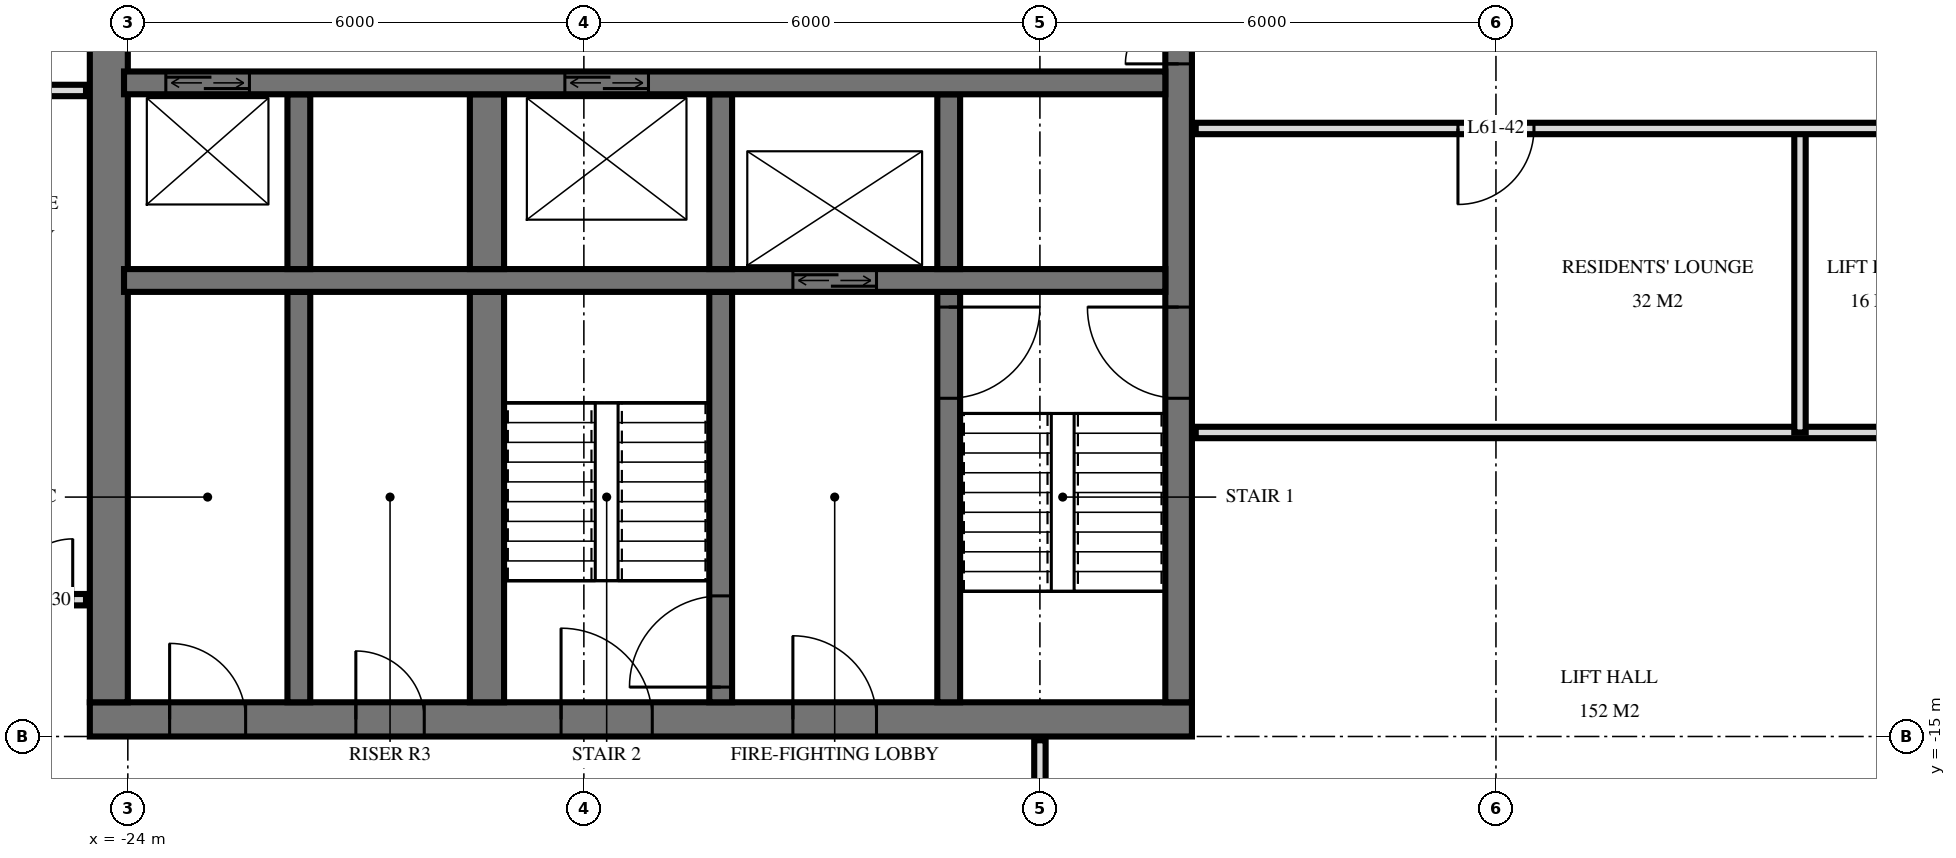
"""IFC4 building model, lengths in metres.
Left out: names, types, materials, properties, quantities, classifications, styles, units other than length and angle.
Written with IfcOpenShell. Run it as: python <this file> out.ifc"""

import sys

from ifc_helpers import new_model, si_unit, direction, frame, frame_2d, origin, place, context, subcontext, project, spatial, rectangle, extrude, element, fill, save


model = new_model("IFC4")
c1 = context("Model", 3, precision=1e-05, world=origin(), true_north=direction((0.0, 1.0)))
c2 = subcontext(c1, "Body", "Model", "MODEL_VIEW")
j1 = project(units=[si_unit("LENGTHUNIT", "METRE"), si_unit("PLANEANGLEUNIT", "RADIAN")], contexts=[c1])
p1 = place(None, origin())
s1 = spatial("IfcSite", under=j1, at=p1, CompositionType="ELEMENT")
p2 = place(p1, origin())
s2 = spatial("IfcBuilding", under=s1, at=p2, CompositionType="ELEMENT")
p3 = place(p2, frame((0.0, 0.0, 232.6)))
s3 = spatial("IfcBuildingStorey", under=s2, at=p3, CompositionType="ELEMENT", Elevation=232.6)
p4 = place(p3, frame((-24.5, -14.775, 0.0), z_axis=(0.0, 0.0, 1.0), x_axis=(1.0, 0.0, 0.0)))
e1 = element("IfcWall", 1, at=p4, inside=s3, PredefinedType="SHEAR", context=c2, shape_type="SweptSolid", body=[
    extrude(rectangle(XDim=14.5, YDim=0.45, at=frame_2d((7.25, 0.0))), origin(), (0.0, 0.0, 1.0), 3.5),
])
p5 = place(p4, frame((6.2, 0.0, 0.0)))
e2 = element("IfcOpeningElement", 2, at=p5, cuts=e1, PredefinedType="OPENING", context=c2, shape_type="SweptSolid", body=[
    extrude(rectangle(XDim=1.2, YDim=2.1, at=frame_2d((0.6, 1.05))), frame((0.0, 0.235, 0.0), z_axis=(0.0, -1.0, 0.0), x_axis=(1.0, 0.0, 0.0)), (0.0, 0.0, 1.0), 0.47),
])
p6 = place(p4, frame((9.25, 0.0, 0.0)))
e3 = element("IfcOpeningElement", 3, at=p6, cuts=e1, PredefinedType="OPENING", context=c2, shape_type="SweptSolid", body=[
    extrude(rectangle(XDim=1.1, YDim=2.1, at=frame_2d((0.55, 1.05))), frame((0.0, 0.235, 0.0), z_axis=(0.0, -1.0, 0.0), x_axis=(1.0, 0.0, 0.0)), (0.0, 0.0, 1.0), 0.47),
])
p7 = place(p4, frame((3.5, 0.0, 0.0)))
e4 = element("IfcOpeningElement", 4, at=p7, cuts=e1, PredefinedType="OPENING", context=c2, shape_type="SweptSolid", body=[
    extrude(rectangle(XDim=0.9, YDim=2.1, at=frame_2d((0.45, 1.05))), frame((0.0, 0.235, 0.0), z_axis=(0.0, -1.0, 0.0), x_axis=(1.0, 0.0, 0.0)), (0.0, 0.0, 1.0), 0.47),
])
p8 = place(p4, frame((1.05, 0.0, 0.0)))
e5 = element("IfcOpeningElement", 5, at=p8, cuts=e1, PredefinedType="OPENING", context=c2, shape_type="SweptSolid", body=[
    extrude(rectangle(XDim=1.0, YDim=2.1, at=frame_2d((0.5, 1.05))), frame((0.0, 0.235, 0.0), z_axis=(0.0, -1.0, 0.0), x_axis=(1.0, 0.0, 0.0)), (0.0, 0.0, 1.0), 0.47),
])
p9 = place(p3, frame((-10.175, -14.55, 0.0), z_axis=(0.0, 0.0, 1.0), x_axis=(0.0, 1.0, 0.0)))
e6 = element("IfcWall", 6, at=p9, inside=s3, PredefinedType="SHEAR", context=c2, shape_type="SweptSolid", body=[
    extrude(rectangle(XDim=14.1, YDim=0.35, at=frame_2d((7.05, 0.0))), origin(), (0.0, 0.0, 1.0), 3.5),
])
p10 = place(p9, frame((8.4, 0.0, 0.0)))
e7 = element("IfcOpeningElement", 7, at=p10, cuts=e6, PredefinedType="OPENING", context=c2, shape_type="SweptSolid", body=[
    extrude(rectangle(XDim=1.4, YDim=2.4, at=frame_2d((0.7, 1.2))), frame((0.0, 0.185, 0.0), z_axis=(0.0, -1.0, 0.0), x_axis=(1.0, 0.0, 0.0)), (0.0, 0.0, 1.0), 0.37),
])
p11 = place(p9, frame((10.0, 0.0, 0.0)))
e8 = element("IfcOpeningElement", 8, at=p11, cuts=e6, PredefinedType="OPENING", context=c2, shape_type="SweptSolid", body=[
    extrude(rectangle(XDim=1.4, YDim=2.4, at=frame_2d((0.7, 1.2))), frame((0.0, 0.185, 0.0), z_axis=(0.0, -1.0, 0.0), x_axis=(1.0, 0.0, 0.0)), (0.0, 0.0, 1.0), 0.37),
])
p12 = place(p9, frame((4.0, 0.0, 0.0)))
e9 = element("IfcOpeningElement", 9, at=p12, cuts=e6, PredefinedType="OPENING", context=c2, shape_type="SweptSolid", body=[
    extrude(rectangle(XDim=1.2, YDim=2.1, at=frame_2d((0.6, 1.05))), frame((0.0, 0.185, 0.0), z_axis=(0.0, -1.0, 0.0), x_axis=(1.0, 0.0, 0.0)), (0.0, 0.0, 1.0), 0.37),
])
p13 = place(p3, frame((-24.25, -14.55, 0.0), z_axis=(0.0, 0.0, 1.0), x_axis=(0.0, 1.0, 0.0)))
e10 = element("IfcWall", 10, at=p13, inside=s3, PredefinedType="SHEAR", context=c2, shape_type="SweptSolid", body=[
    extrude(rectangle(XDim=14.1, YDim=0.5, at=frame_2d((7.05, 0.0))), origin(), (0.0, 0.0, 1.0), 3.5),
])
p14 = place(p3, frame((-24.05, -6.4, 0.0), z_axis=(0.0, 0.0, 1.0), x_axis=(1.0, 0.0, 0.0)))
e11 = element("IfcWall", 11, at=p14, inside=s3, PredefinedType="SHEAR", context=c2, shape_type="SweptSolid", body=[
    extrude(rectangle(XDim=13.7, YDim=0.3, at=frame_2d((6.85, 0.0))), origin(), (0.0, 0.0, 1.0), 3.5),
])
p15 = place(p14, frame((0.55, 0.0, 0.0)))
e12 = element("IfcOpeningElement", 12, at=p15, cuts=e11, PredefinedType="OPENING", context=c2, shape_type="SweptSolid", body=[
    extrude(rectangle(XDim=1.1, YDim=2.1, at=frame_2d((0.55, 1.05))), frame((0.0, 0.16, 0.0), z_axis=(0.0, -1.0, 0.0), x_axis=(1.0, 0.0, 0.0)), (0.0, 0.0, 1.0), 0.32),
])
p16 = place(p14, frame((5.8, 0.0, 0.0)))
e13 = element("IfcOpeningElement", 13, at=p16, cuts=e11, PredefinedType="OPENING", context=c2, shape_type="SweptSolid", body=[
    extrude(rectangle(XDim=1.1, YDim=2.1, at=frame_2d((0.55, 1.05))), frame((0.0, 0.16, 0.0), z_axis=(0.0, -1.0, 0.0), x_axis=(1.0, 0.0, 0.0)), (0.0, 0.0, 1.0), 0.32),
])
p17 = place(p3, frame((-24.05, -9.0, 0.0), z_axis=(0.0, 0.0, 1.0), x_axis=(1.0, 0.0, 0.0)))
e14 = element("IfcWall", 14, at=p17, inside=s3, PredefinedType="SHEAR", context=c2, shape_type="SweptSolid", body=[
    extrude(rectangle(XDim=13.7, YDim=0.3, at=frame_2d((6.85, 0.0))), origin(), (0.0, 0.0, 1.0), 3.5),
])
p18 = place(p17, frame((8.8, 0.0, 0.0)))
e15 = element("IfcOpeningElement", 15, at=p18, cuts=e14, PredefinedType="OPENING", context=c2, shape_type="SweptSolid", body=[
    extrude(rectangle(XDim=1.1, YDim=2.1, at=frame_2d((0.55, 1.05))), frame((0.0, 0.16, 0.0), z_axis=(0.0, -1.0, 0.0), x_axis=(1.0, 0.0, 0.0)), (0.0, 0.0, 1.0), 0.32),
])
p19 = place(p3, frame((-13.2, -8.85, 0.0), z_axis=(0.0, 0.0, 1.0), x_axis=(0.0, 1.0, 0.0)))
e16 = element("IfcWall", 16, at=p19, inside=s3, PredefinedType="SHEAR", context=c2, shape_type="SweptSolid", body=[
    extrude(rectangle(XDim=2.3, YDim=0.3, at=frame_2d((1.15, 0.0))), origin(), (0.0, 0.0, 1.0), 3.5),
])
p20 = place(p3, frame((-13.2, -14.55, 0.0), z_axis=(0.0, 0.0, 1.0), x_axis=(0.0, 1.0, 0.0)))
e17 = element("IfcWall", 17, at=p20, inside=s3, PredefinedType="SHEAR", context=c2, shape_type="SweptSolid", body=[
    extrude(rectangle(XDim=5.4, YDim=0.3, at=frame_2d((2.7, 0.0))), origin(), (0.0, 0.0, 1.0), 3.5),
])
p21 = place(p20, frame((4.0, 0.0, 0.0)))
e18 = element("IfcOpeningElement", 18, at=p21, cuts=e17, PredefinedType="OPENING", context=c2, shape_type="SweptSolid", body=[
    extrude(rectangle(XDim=1.2, YDim=2.1, at=frame_2d((0.6, 1.05))), frame((0.0, 0.16, 0.0), z_axis=(0.0, -1.0, 0.0), x_axis=(1.0, 0.0, 0.0)), (0.0, 0.0, 1.0), 0.32),
])
p22 = place(p3, frame((-16.2, -8.85, 0.0), z_axis=(0.0, 0.0, 1.0), x_axis=(0.0, 1.0, 0.0)))
e19 = element("IfcWall", 19, at=p22, inside=s3, PredefinedType="SHEAR", context=c2, shape_type="SweptSolid", body=[
    extrude(rectangle(XDim=2.3, YDim=0.3, at=frame_2d((1.15, 0.0))), origin(), (0.0, 0.0, 1.0), 3.5),
])
p23 = place(p3, frame((-16.2, -14.55, 0.0), z_axis=(0.0, 0.0, 1.0), x_axis=(0.0, 1.0, 0.0)))
e20 = element("IfcWall", 20, at=p23, inside=s3, PredefinedType="SHEAR", context=c2, shape_type="SweptSolid", body=[
    extrude(rectangle(XDim=5.4, YDim=0.3, at=frame_2d((2.7, 0.0))), origin(), (0.0, 0.0, 1.0), 3.5),
])
p24 = place(p23, frame((0.2, 0.0, 0.0)))
e21 = element("IfcOpeningElement", 21, at=p24, cuts=e20, PredefinedType="OPENING", context=c2, shape_type="SweptSolid", body=[
    extrude(rectangle(XDim=1.2, YDim=2.1, at=frame_2d((0.6, 1.05))), frame((0.0, 0.16, 0.0), z_axis=(0.0, -1.0, 0.0), x_axis=(1.0, 0.0, 0.0)), (0.0, 0.0, 1.0), 0.32),
])
p25 = place(p3, frame((-19.275, -8.85, 0.0), z_axis=(0.0, 0.0, 1.0), x_axis=(0.0, 1.0, 0.0)))
e22 = element("IfcWall", 22, at=p25, inside=s3, PredefinedType="SHEAR", context=c2, shape_type="SweptSolid", body=[
    extrude(rectangle(XDim=2.3, YDim=0.45, at=frame_2d((1.15, 0.0))), origin(), (0.0, 0.0, 1.0), 3.5),
])
p26 = place(p3, frame((-19.275, -14.55, 0.0), z_axis=(0.0, 0.0, 1.0), x_axis=(0.0, 1.0, 0.0)))
e23 = element("IfcWall", 23, at=p26, inside=s3, PredefinedType="SHEAR", context=c2, shape_type="SweptSolid", body=[
    extrude(rectangle(XDim=5.4, YDim=0.45, at=frame_2d((2.7, 0.0))), origin(), (0.0, 0.0, 1.0), 3.5),
])
p27 = place(p3, frame((-21.75, -8.85, 0.0), z_axis=(0.0, 0.0, 1.0), x_axis=(0.0, 1.0, 0.0)))
e24 = element("IfcWall", 24, at=p27, inside=s3, PredefinedType="SHEAR", context=c2, shape_type="SweptSolid", body=[
    extrude(rectangle(XDim=2.3, YDim=0.3, at=frame_2d((1.15, 0.0))), origin(), (0.0, 0.0, 1.0), 3.5),
])
p28 = place(p3, frame((-21.75, -14.55, 0.0), z_axis=(0.0, 0.0, 1.0), x_axis=(0.0, 1.0, 0.0)))
e25 = element("IfcWall", 25, at=p28, inside=s3, PredefinedType="SHEAR", context=c2, shape_type="SweptSolid", body=[
    extrude(rectangle(XDim=5.4, YDim=0.3, at=frame_2d((2.7, 0.0))), origin(), (0.0, 0.0, 1.0), 3.5),
])
p29 = place(p3, frame((-2.0, -11.0, 0.0), z_axis=(0.0, 0.0, 1.0), x_axis=(0.0, 1.0, 0.0)))
e26 = element("IfcWall", 26, at=p29, inside=s3, PredefinedType="PARTITIONING", context=c2, shape_type="SweptSolid", body=[
    extrude(rectangle(XDim=4.0, YDim=0.15, at=frame_2d((2.0, 0.0))), origin(), (0.0, 0.0, 1.0), 3.22),
])
p30 = place(p3, frame((-12.0, -18.0, 0.0), z_axis=(0.0, 0.0, 1.0), x_axis=(0.0, 1.0, 0.0)))
e27 = element("IfcWall", 27, at=p30, inside=s3, PredefinedType="PARTITIONING", context=c2, shape_type="SweptSolid", body=[
    extrude(rectangle(XDim=2.95, YDim=0.15, at=frame_2d((1.475, 0.0))), origin(), (0.0, 0.0, 1.0), 3.22),
])
p31 = place(p30, frame((1.0, 0.0, 0.0)))
e28 = element("IfcOpeningElement", 28, at=p31, cuts=e27, PredefinedType="OPENING", context=c2, shape_type="SweptSolid", body=[
    extrude(rectangle(XDim=1.0, YDim=2.1, at=frame_2d((0.5, 1.05))), frame((0.0, 0.085, 0.0), z_axis=(0.0, -1.0, 0.0), x_axis=(1.0, 0.0, 0.0)), (0.0, 0.0, 1.0), 0.17),
])
p32 = place(p3, frame((-25.7, -13.2, 0.0), z_axis=(0.0, 0.0, 1.0), x_axis=(1.0, 0.0, 0.0)))
e29 = element("IfcWall", 29, at=p32, inside=s3, PredefinedType="PARTITIONING", context=c2, shape_type="SweptSolid", body=[
    extrude(rectangle(XDim=1.15, YDim=0.15, at=frame_2d((0.575, 0.0))), origin(), (0.0, 0.0, 1.0), 3.22),
])
p33 = place(p32, frame((0.175, 0.0, 0.0)))
e30 = element("IfcOpeningElement", 30, at=p33, cuts=e29, PredefinedType="OPENING", context=c2, shape_type="SweptSolid", body=[
    extrude(rectangle(XDim=0.8, YDim=2.1, at=frame_2d((0.4, 1.05))), frame((0.0, 0.085, 0.0), z_axis=(0.0, -1.0, 0.0), x_axis=(1.0, 0.0, 0.0)), (0.0, 0.0, 1.0), 0.17),
])
p34 = place(p3, frame((-9.95, -11.0, 0.0), z_axis=(0.0, 0.0, 1.0), x_axis=(1.0, 0.0, 0.0)))
e31 = element("IfcWall", 31, at=p34, inside=s3, PredefinedType="PARTITIONING", context=c2, shape_type="SweptSolid", body=[
    extrude(rectangle(XDim=19.9, YDim=0.15, at=frame_2d((9.95, 0.0))), origin(), (0.0, 0.0, 1.0), 3.22),
])
p35 = place(p34, frame((9.45, 0.0, 0.0)))
e32 = element("IfcOpeningElement", 32, at=p35, cuts=e31, PredefinedType="OPENING", context=c2, shape_type="SweptSolid", body=[
    extrude(rectangle(XDim=1.0, YDim=2.1, at=frame_2d((0.5, 1.05))), frame((0.0, 0.085, 0.0), z_axis=(0.0, -1.0, 0.0), x_axis=(1.0, 0.0, 0.0)), (0.0, 0.0, 1.0), 0.17),
])
p36 = place(p34, frame((15.45, 0.0, 0.0)))
e33 = element("IfcOpeningElement", 33, at=p36, cuts=e31, PredefinedType="OPENING", context=c2, shape_type="SweptSolid", body=[
    extrude(rectangle(XDim=1.0, YDim=2.1, at=frame_2d((0.5, 1.05))), frame((0.0, 0.085, 0.0), z_axis=(0.0, -1.0, 0.0), x_axis=(1.0, 0.0, 0.0)), (0.0, 0.0, 1.0), 0.17),
])
p37 = place(p3, frame((-9.95, -7.0, 0.0), z_axis=(0.0, 0.0, 1.0), x_axis=(1.0, 0.0, 0.0)))
e34 = element("IfcWall", 34, at=p37, inside=s3, PredefinedType="PARTITIONING", context=c2, shape_type="SweptSolid", body=[
    extrude(rectangle(XDim=19.9, YDim=0.15, at=frame_2d((9.95, 0.0))), origin(), (0.0, 0.0, 1.0), 3.22),
])
p38 = place(p37, frame((9.45, 0.0, 0.0)))
e35 = element("IfcOpeningElement", 35, at=p38, cuts=e34, PredefinedType="OPENING", context=c2, shape_type="SweptSolid", body=[
    extrude(rectangle(XDim=1.0, YDim=2.1, at=frame_2d((0.5, 1.05))), frame((0.0, 0.085, 0.0), z_axis=(0.0, -1.0, 0.0), x_axis=(1.0, 0.0, 0.0)), (0.0, 0.0, 1.0), 0.17),
])
p39 = place(p37, frame((3.45, 0.0, 0.0)))
e36 = element("IfcOpeningElement", 36, at=p39, cuts=e34, PredefinedType="OPENING", context=c2, shape_type="SweptSolid", body=[
    extrude(rectangle(XDim=1.0, YDim=2.1, at=frame_2d((0.5, 1.05))), frame((0.0, 0.085, 0.0), z_axis=(0.0, -1.0, 0.0), x_axis=(1.0, 0.0, 0.0)), (0.0, 0.0, 1.0), 0.17),
])
p40 = place(p3, frame((-26.82, -6.5, 0.0), z_axis=(0.0, 0.0, 1.0), x_axis=(1.0, 0.0, 0.0)))
e37 = element("IfcWall", 37, at=p40, inside=s3, PredefinedType="PARTITIONING", context=c2, shape_type="SweptSolid", body=[
    extrude(rectangle(XDim=2.27, YDim=0.15, at=frame_2d((1.135, 0.0))), origin(), (0.0, 0.0, 1.0), 3.22),
])
p41 = place(p40, frame((0.62, 0.0, 0.0)))
e38 = element("IfcOpeningElement", 38, at=p41, cuts=e37, PredefinedType="OPENING", context=c2, shape_type="SweptSolid", body=[
    extrude(rectangle(XDim=0.9, YDim=2.1, at=frame_2d((0.45, 1.05))), frame((0.0, 0.085, 0.0), z_axis=(0.0, -1.0, 0.0), x_axis=(1.0, 0.0, 0.0)), (0.0, 0.0, 1.0), 0.17),
])
p42 = place(p15, origin())
e39 = element("IfcDoor", 39, at=p42, inside=s3, OperationType="DOUBLE_DOOR_SLIDING", PredefinedType="USERDEFINED", context=c2, shape_type="SweptSolid", body=[
    extrude(rectangle(XDim=1.1, YDim=2.1, at=frame_2d((0.55, 1.05))), frame((0.0, 0.025, 0.0), z_axis=(0.0, -1.0, 0.0), x_axis=(1.0, 0.0, 0.0)), (0.0, 0.0, 1.0), 0.05),
])
fill(e12, e39)
p43 = place(p18, origin())
e40 = element("IfcDoor", 40, at=p43, inside=s3, OperationType="DOUBLE_DOOR_SLIDING", PredefinedType="USERDEFINED", context=c2, shape_type="SweptSolid", body=[
    extrude(rectangle(XDim=1.1, YDim=2.1, at=frame_2d((0.55, 1.05))), frame((0.0, 0.025, 0.0), z_axis=(0.0, -1.0, 0.0), x_axis=(1.0, 0.0, 0.0)), (0.0, 0.0, 1.0), 0.05),
])
fill(e15, e40)
p44 = place(p16, origin())
e41 = element("IfcDoor", 41, at=p44, inside=s3, OperationType="DOUBLE_DOOR_SLIDING", PredefinedType="USERDEFINED", context=c2, shape_type="SweptSolid", body=[
    extrude(rectangle(XDim=1.1, YDim=2.1, at=frame_2d((0.55, 1.05))), frame((0.0, 0.025, 0.0), z_axis=(0.0, -1.0, 0.0), x_axis=(1.0, 0.0, 0.0)), (0.0, 0.0, 1.0), 0.05),
])
fill(e13, e41)
p45 = place(p10, origin())
e42 = element("IfcDoor", 42, at=p45, inside=s3, OperationType="DOUBLE_DOOR_SINGLE_SWING", PredefinedType="DOOR", context=c2, shape_type="SweptSolid", body=[
    extrude(rectangle(XDim=1.4, YDim=2.4, at=frame_2d((0.7, 1.2))), frame((0.0, 0.025, 0.0), z_axis=(0.0, -1.0, 0.0), x_axis=(1.0, 0.0, 0.0)), (0.0, 0.0, 1.0), 0.05),
])
fill(e7, e42)
p46 = place(p12, origin())
e43 = element("IfcDoor", 43, at=p46, inside=s3, OperationType="SINGLE_SWING_LEFT", PredefinedType="DOOR", context=c2, shape_type="SweptSolid", body=[
    extrude(rectangle(XDim=1.2, YDim=2.1, at=frame_2d((0.6, 1.05))), frame((0.0, 0.025, 0.0), z_axis=(0.0, -1.0, 0.0), x_axis=(1.0, 0.0, 0.0)), (0.0, 0.0, 1.0), 0.05),
])
fill(e9, e43)
p47 = place(p5, origin())
e44 = element("IfcDoor", 44, at=p47, inside=s3, OperationType="SINGLE_SWING_RIGHT", PredefinedType="DOOR", context=c2, shape_type="SweptSolid", body=[
    extrude(rectangle(XDim=1.2, YDim=2.1, at=frame_2d((0.6, 1.05))), frame((0.0, 0.025, 0.0), z_axis=(0.0, -1.0, 0.0), x_axis=(1.0, 0.0, 0.0)), (0.0, 0.0, 1.0), 0.05),
])
fill(e2, e44)
p48 = place(p6, origin())
e45 = element("IfcDoor", 45, at=p48, inside=s3, OperationType="SINGLE_SWING_RIGHT", PredefinedType="DOOR", context=c2, shape_type="SweptSolid", body=[
    extrude(rectangle(XDim=1.1, YDim=2.1, at=frame_2d((0.55, 1.05))), frame((0.0, 0.025, 0.0), z_axis=(0.0, -1.0, 0.0), x_axis=(1.0, 0.0, 0.0)), (0.0, 0.0, 1.0), 0.05),
])
fill(e3, e45)
p49 = place(p7, origin())
e46 = element("IfcDoor", 46, at=p49, inside=s3, OperationType="SINGLE_SWING_RIGHT", PredefinedType="DOOR", context=c2, shape_type="SweptSolid", body=[
    extrude(rectangle(XDim=0.9, YDim=2.1, at=frame_2d((0.45, 1.05))), frame((0.0, 0.025, 0.0), z_axis=(0.0, -1.0, 0.0), x_axis=(1.0, 0.0, 0.0)), (0.0, 0.0, 1.0), 0.05),
])
fill(e4, e46)
p50 = place(p8, origin())
e47 = element("IfcDoor", 47, at=p50, inside=s3, OperationType="SINGLE_SWING_RIGHT", PredefinedType="DOOR", context=c2, shape_type="SweptSolid", body=[
    extrude(rectangle(XDim=1.0, YDim=2.1, at=frame_2d((0.5, 1.05))), frame((0.0, 0.025, 0.0), z_axis=(0.0, -1.0, 0.0), x_axis=(1.0, 0.0, 0.0)), (0.0, 0.0, 1.0), 0.05),
])
fill(e5, e47)
p51 = place(p21, frame((0.6, 0.0, 0.0), z_axis=(0.0, 0.0, 1.0), x_axis=(-1.0, 0.0, 0.0)))
e48 = element("IfcDoor", 48, at=p51, inside=s3, OperationType="SINGLE_SWING_RIGHT", PredefinedType="DOOR", context=c2, shape_type="SweptSolid", body=[
    extrude(rectangle(XDim=1.2, YDim=2.1, at=frame_2d((0.0, 1.05))), frame((0.0, -0.025, 0.0), z_axis=(0.0, 1.0, 0.0), x_axis=(-1.0, 0.0, 0.0)), (0.0, 0.0, 1.0), 0.05),
])
fill(e18, e48)
p52 = place(p24, origin())
e49 = element("IfcDoor", 49, at=p52, inside=s3, OperationType="SINGLE_SWING_RIGHT", PredefinedType="DOOR", context=c2, shape_type="SweptSolid", body=[
    extrude(rectangle(XDim=1.2, YDim=2.1, at=frame_2d((0.6, 1.05))), frame((0.0, 0.025, 0.0), z_axis=(0.0, -1.0, 0.0), x_axis=(1.0, 0.0, 0.0)), (0.0, 0.0, 1.0), 0.05),
])
fill(e21, e49)
p53 = place(p33, origin())
e50 = element("IfcDoor", 50, at=p53, inside=s3, OperationType="SINGLE_SWING_LEFT", PredefinedType="DOOR", context=c2, shape_type="SweptSolid", body=[
    extrude(rectangle(XDim=0.8, YDim=2.1, at=frame_2d((0.4, 1.05))), frame((0.0, 0.025, 0.0), z_axis=(0.0, -1.0, 0.0), x_axis=(1.0, 0.0, 0.0)), (0.0, 0.0, 1.0), 0.05),
])
fill(e30, e50)
p54 = place(p39, frame((0.5, 0.0, 0.0), z_axis=(0.0, 0.0, 1.0), x_axis=(-1.0, 0.0, 0.0)))
e51 = element("IfcDoor", 51, at=p54, inside=s3, OperationType="SINGLE_SWING_LEFT", PredefinedType="DOOR", context=c2, shape_type="SweptSolid", body=[
    extrude(rectangle(XDim=1.0, YDim=2.1, at=frame_2d((0.0, 1.05))), frame((0.0, -0.025, 0.0), z_axis=(0.0, 1.0, 0.0), x_axis=(-1.0, 0.0, 0.0)), (0.0, 0.0, 1.0), 0.05),
])
fill(e36, e51)
save(model, sys.argv[1])
